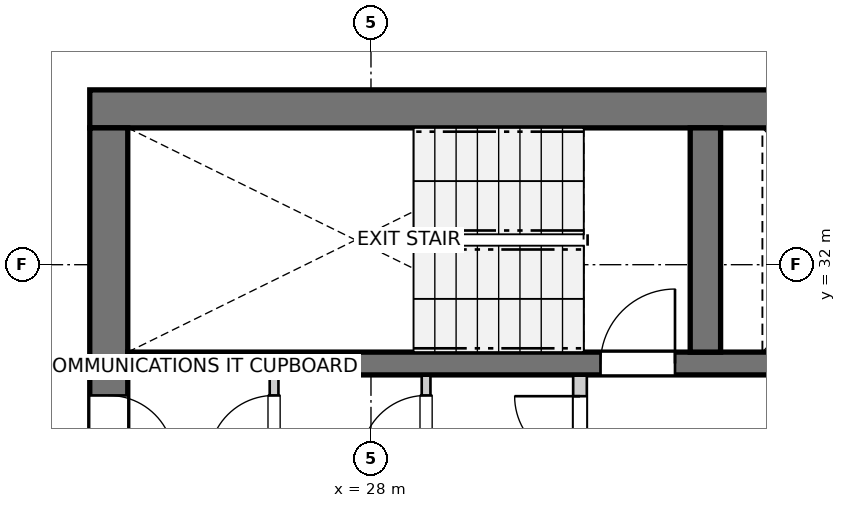
"""IFC4 building model, lengths in metres.
Left out: names, types, materials, properties, quantities, classifications, styles, units other than length and angle.
Written with IfcOpenShell. Run it as: python <this file> out.ifc"""

import sys

from ifc_helpers import new_model, si_unit, direction, frame, frame_2d, origin, place, context, subcontext, project, spatial, rectangle, extrude, source, transform, mapped, element, fill, save


model = new_model("IFC4")
c1 = context("Model", 3, precision=1e-05, world=origin(), true_north=direction((0.0, 1.0)))
c2 = subcontext(c1, "Body", "Model", "MODEL_VIEW")
j1 = project(units=[si_unit("LENGTHUNIT", "METRE"), si_unit("PLANEANGLEUNIT", "RADIAN")], contexts=[c1])
p1 = place(None, origin())
s1 = spatial("IfcSite", under=j1, at=p1, CompositionType="ELEMENT")
p2 = place(p1, origin())
s2 = spatial("IfcBuilding", under=s1, at=p2, CompositionType="ELEMENT")
p3 = place(p2, frame((0.0, 0.0, 250.0)))
s3 = spatial("IfcBuildingStorey", under=s2, at=p3, CompositionType="ELEMENT", Elevation=250.0)
p4 = place(p3, frame((36.4, 34.05, 0.0), z_axis=(0.0, 0.0, 1.0), x_axis=(-1.0, 0.0, 0.0)))
e1 = element("IfcWall", 1, at=p4, inside=s3, PredefinedType="SHEAR", context=c2, shape_type="SweptSolid", body=[
    extrude(rectangle(XDim=12.1, YDim=0.5, at=frame_2d((6.05, 0.0))), origin(), (0.0, 0.0, 1.0), 2.95),
])
p5 = place(p3, frame((24.55, 33.8, 0.0), z_axis=(0.0, 0.0, 1.0), x_axis=(0.0, -1.0, 0.0)))
e2 = element("IfcWall", 2, at=p5, inside=s3, PredefinedType="SHEAR", context=c2, shape_type="SweptSolid", body=[
    extrude(rectangle(XDim=15.6, YDim=0.5, at=frame_2d((7.8, 0.0))), origin(), (0.0, 0.0, 1.0), 2.95),
])
p6 = place(p5, frame((7.05, 0.0, 0.0)))
e3 = element("IfcOpeningElement", 3, at=p6, cuts=e2, PredefinedType="OPENING", context=c2, shape_type="SweptSolid", body=[
    extrude(rectangle(XDim=1.5, YDim=2.15, at=frame_2d((0.75, 1.075))), frame((0.0, 0.26, 0.0), z_axis=(0.0, -1.0, 0.0), x_axis=(1.0, 0.0, 0.0)), (0.0, 0.0, 1.0), 0.52),
])
p7 = place(p5, frame((3.52, 0.0, 0.0)))
e4 = element("IfcOpeningElement", 4, at=p7, cuts=e2, PredefinedType="OPENING", context=c2, shape_type="SweptSolid", body=[
    extrude(rectangle(XDim=0.86, YDim=2.05, at=frame_2d((0.43, 1.025))), frame((0.0, 0.26, 0.0), z_axis=(0.0, -1.0, 0.0), x_axis=(1.0, 0.0, 0.0)), (0.0, 0.0, 1.0), 0.52),
])
p8 = place(p5, frame((11.22, 0.0, 0.0)))
e5 = element("IfcOpeningElement", 5, at=p8, cuts=e2, PredefinedType="OPENING", context=c2, shape_type="SweptSolid", body=[
    extrude(rectangle(XDim=0.86, YDim=2.05, at=frame_2d((0.43, 1.025))), frame((0.0, 0.26, 0.0), z_axis=(0.0, -1.0, 0.0), x_axis=(1.0, 0.0, 0.0)), (0.0, 0.0, 1.0), 0.52),
])
p9 = place(p3, frame((24.8, 30.7, 0.0), z_axis=(0.0, 0.0, 1.0), x_axis=(1.0, 0.0, 0.0)))
e6 = element("IfcWall", 6, at=p9, inside=s3, PredefinedType="SHEAR", context=c2, shape_type="SweptSolid", body=[
    extrude(rectangle(XDim=11.1, YDim=0.3, at=frame_2d((5.55, 0.0))), origin(), (0.0, 0.0, 1.0), 2.95),
])
p10 = place(p9, frame((6.22, 0.0, 0.0)))
e7 = element("IfcOpeningElement", 7, at=p10, cuts=e6, PredefinedType="OPENING", context=c2, shape_type="SweptSolid", body=[
    extrude(rectangle(XDim=0.98, YDim=2.15, at=frame_2d((0.49, 1.075))), frame((0.0, 0.16, 0.0), z_axis=(0.0, -1.0, 0.0), x_axis=(1.0, 0.0, 0.0)), (0.0, 0.0, 1.0), 0.32),
])
p11 = place(p9, frame((9.15, 0.0, 0.0)))
e8 = element("IfcOpeningElement", 8, at=p11, cuts=e6, PredefinedType="OPENING", context=c2, shape_type="SweptSolid", body=[
    extrude(rectangle(XDim=1.15, YDim=2.15, at=frame_2d((0.575, 1.075))), frame((0.0, 0.16, 0.0), z_axis=(0.0, -1.0, 0.0), x_axis=(1.0, 0.0, 0.0)), (0.0, 0.0, 1.0), 0.32),
])
p12 = place(p3, frame((32.4, 30.85, 0.0), z_axis=(0.0, 0.0, 1.0), x_axis=(0.0, 1.0, 0.0)))
e9 = element("IfcWall", 9, at=p12, inside=s3, PredefinedType="SHEAR", context=c2, shape_type="SweptSolid", body=[
    extrude(rectangle(XDim=2.95, YDim=0.4, at=frame_2d((1.475, 0.0))), origin(), (0.0, 0.0, 1.0), 2.95),
])
p13 = place(p3, frame((30.75, 27.43, 0.0), z_axis=(0.0, 0.0, 1.0), x_axis=(0.0, 1.0, 0.0)))
e10 = element("IfcWall", 10, at=p13, inside=s3, PredefinedType="PARTITIONING", context=c2, shape_type="SweptSolid", body=[
    extrude(rectangle(XDim=3.11, YDim=0.18, at=frame_2d((1.555, 0.0))), origin(), (0.0, 0.0, 1.0), 2.95),
])
p14 = place(p13, frame((1.98, 0.0, 0.0)))
e11 = element("IfcOpeningElement", 11, at=p14, cuts=e10, PredefinedType="OPENING", context=c2, shape_type="SweptSolid", body=[
    extrude(rectangle(XDim=0.86, YDim=2.05, at=frame_2d((0.43, 1.025))), frame((0.0, 0.1, 0.0), z_axis=(0.0, -1.0, 0.0), x_axis=(1.0, 0.0, 0.0)), (0.0, 0.0, 1.0), 0.2),
])
p15 = place(p3, frame((26.725, 29.16, 0.0), z_axis=(0.0, 0.0, 1.0), x_axis=(0.0, 1.0, 0.0)))
e12 = element("IfcWall", 12, at=p15, inside=s3, PredefinedType="PARTITIONING", context=c2, shape_type="SweptSolid", body=[
    extrude(rectangle(XDim=1.38, YDim=0.115, at=frame_2d((0.69, 0.0))), origin(), (0.0, 0.0, 1.0), 2.95),
])
p16 = place(p15, frame((0.26, 0.0, 0.0)))
e13 = element("IfcOpeningElement", 13, at=p16, cuts=e12, PredefinedType="OPENING", context=c2, shape_type="SweptSolid", body=[
    extrude(rectangle(XDim=0.86, YDim=2.05, at=frame_2d((0.43, 1.025))), frame((0.0, 0.067, 0.0), z_axis=(0.0, -1.0, 0.0), x_axis=(1.0, 0.0, 0.0)), (0.0, 0.0, 1.0), 0.135),
])
p17 = place(p3, frame((28.725, 29.16, 0.0), z_axis=(0.0, 0.0, 1.0), x_axis=(0.0, 1.0, 0.0)))
e14 = element("IfcWall", 14, at=p17, inside=s3, PredefinedType="PARTITIONING", context=c2, shape_type="SweptSolid", body=[
    extrude(rectangle(XDim=1.38, YDim=0.115, at=frame_2d((0.69, 0.0))), origin(), (0.0, 0.0, 1.0), 2.95),
])
p18 = place(p17, frame((0.26, 0.0, 0.0)))
e15 = element("IfcOpeningElement", 15, at=p18, cuts=e14, PredefinedType="OPENING", context=c2, shape_type="SweptSolid", body=[
    extrude(rectangle(XDim=0.86, YDim=2.05, at=frame_2d((0.43, 1.025))), frame((0.0, 0.067, 0.0), z_axis=(0.0, -1.0, 0.0), x_axis=(1.0, 0.0, 0.0)), (0.0, 0.0, 1.0), 0.135),
])
m1 = source(origin(), c2, "Body", "SweptSolid", [
    extrude(rectangle(XDim=0.98, YDim=2.15, at=frame_2d((0.49, 1.075))), frame((0.0, 0.025, 0.0), z_axis=(0.0, -1.0, 0.0), x_axis=(1.0, 0.0, 0.0)), (0.0, 0.0, 1.0), 0.05),
])
p19 = place(p10, origin())
e16 = element("IfcDoor", 16, at=p19, inside=s3, OperationType="SINGLE_SWING_RIGHT", PredefinedType="DOOR", context=c2, shape_type="MappedRepresentation", body=[
    mapped(m1, transform((0.0, 0.0, 0.0), x_axis=(1.0, 0.0, 0.0), y_axis=(0.0, 1.0, 0.0), z_axis=(0.0, 0.0, 1.0), scale=1.0)),
])
fill(e7, e16)
m2 = source(origin(), c2, "Body", "SweptSolid", [
    extrude(rectangle(XDim=0.86, YDim=2.05, at=frame_2d((0.43, 1.025))), frame((0.0, 0.025, 0.0), z_axis=(0.0, -1.0, 0.0), x_axis=(1.0, 0.0, 0.0)), (0.0, 0.0, 1.0), 0.05),
])
p20 = place(p7, origin())
e17 = element("IfcDoor", 17, at=p20, inside=s3, OperationType="SINGLE_SWING_RIGHT", PredefinedType="DOOR", context=c2, shape_type="MappedRepresentation", body=[
    mapped(m2, transform((0.0, 0.0, 0.0), x_axis=(1.0, 0.0, 0.0), y_axis=(0.0, 1.0, 0.0), z_axis=(0.0, 0.0, 1.0), scale=1.0)),
])
fill(e4, e17)
p21 = place(p14, origin())
e18 = element("IfcDoor", 18, at=p21, inside=s3, OperationType="SINGLE_SWING_RIGHT", PredefinedType="DOOR", context=c2, shape_type="MappedRepresentation", body=[
    mapped(m2, transform((0.0, 0.0, 0.0), x_axis=(1.0, 0.0, 0.0), y_axis=(0.0, 1.0, 0.0), z_axis=(0.0, 0.0, 1.0), scale=1.0)),
])
fill(e11, e18)
p22 = place(p16, origin())
e19 = element("IfcDoor", 19, at=p22, inside=s3, OperationType="SINGLE_SWING_LEFT", PredefinedType="DOOR", context=c2, shape_type="MappedRepresentation", body=[
    mapped(m2, transform((0.0, 0.0, 0.0), x_axis=(1.0, 0.0, 0.0), y_axis=(0.0, 1.0, 0.0), z_axis=(0.0, 0.0, 1.0), scale=1.0)),
])
fill(e13, e19)
p23 = place(p18, origin())
e20 = element("IfcDoor", 20, at=p23, inside=s3, OperationType="SINGLE_SWING_LEFT", PredefinedType="DOOR", context=c2, shape_type="MappedRepresentation", body=[
    mapped(m2, transform((0.0, 0.0, 0.0), x_axis=(1.0, 0.0, 0.0), y_axis=(0.0, 1.0, 0.0), z_axis=(0.0, 0.0, 1.0), scale=1.0)),
])
fill(e15, e20)
save(model, sys.argv[1])
